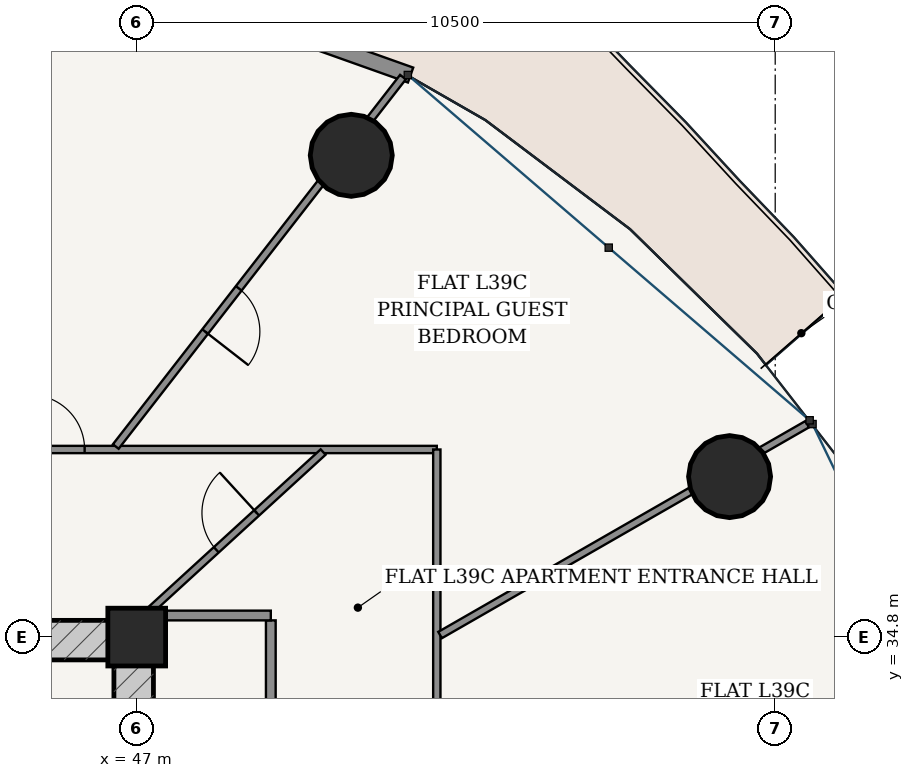
"""IFC4 building model, lengths in metres.
Left out: names, types, materials, properties, quantities, classifications, styles, units other than length and angle.
Written with IfcOpenShell. Run it as: python <this file> out.ifc"""

import sys

from ifc_helpers import new_model, si_unit, direction, frame, frame_2d, origin, origin_2d, place, context, subcontext, project, spatial, rectangle, hollow_circle, extrude, source, transform, mapped, element, fill, save


model = new_model("IFC4")
c1 = context("Model", 3, precision=1e-05, world=origin(), true_north=direction((-0.2419218956, 0.970295726276)))
c2 = subcontext(c1, "Body", "Model", "MODEL_VIEW")
j1 = project(units=[si_unit("LENGTHUNIT", "METRE"), si_unit("PLANEANGLEUNIT", "RADIAN")], contexts=[c1])
p1 = place(None, origin())
s1 = spatial("IfcSite", under=j1, at=p1, CompositionType="ELEMENT")
p2 = place(p1, origin())
s2 = spatial("IfcBuilding", under=s1, at=p2, CompositionType="ELEMENT")
p3 = place(p2, frame((0.0, 0.0, 149.8)))
s3 = spatial("IfcBuildingStorey", under=s2, at=p3, CompositionType="ELEMENT", Elevation=149.8)
p4 = place(p3, frame((47.0, 34.8, 0.0), z_axis=(0.0, 0.0, 1.0), x_axis=(1.0, 0.0, 0.0)))
e1 = element("IfcColumn", 1, at=p4, inside=s3, PredefinedType="COLUMN", context=c2, shape_type="SweptSolid", body=[
    extrude(rectangle(XDim=0.95, YDim=0.95, at=origin_2d()), origin(), (0.0, 0.0, 1.0), 3.6),
])
p5 = place(p3, frame((28.725, 34.75, 0.0), z_axis=(0.0, 0.0, 1.0), x_axis=(1.0, 0.0, 0.0)))
e2 = element("IfcWall", 2, at=p5, inside=s3, PredefinedType="SHEAR", context=c2, shape_type="SweptSolid", body=[
    extrude(rectangle(XDim=18.55, YDim=0.65, at=frame_2d((9.275, 0.0))), origin(), (0.0, 0.0, 1.0), 3.33),
])
p6 = place(p3, frame((46.95, 19.175, 0.0), z_axis=(0.0, 0.0, 1.0), x_axis=(0.0, 1.0, 0.0)))
e3 = element("IfcWall", 3, at=p6, inside=s3, PredefinedType="SHEAR", context=c2, shape_type="SweptSolid", body=[
    extrude(rectangle(XDim=15.25, YDim=0.65, at=frame_2d((7.625, 0.0))), origin(), (0.0, 0.0, 1.0), 3.33),
])
p7 = place(p6, frame((9.875, 0.0, 0.0)))
e4 = element("IfcOpeningElement", 4, at=p7, cuts=e3, PredefinedType="OPENING", context=c2, shape_type="SweptSolid", body=[
    extrude(rectangle(XDim=1.5, YDim=2.2, at=frame_2d((0.75, 1.1))), frame((0.0, 0.335, 0.0), z_axis=(0.0, -1.0, 0.0), x_axis=(1.0, 0.0, 0.0)), (0.0, 0.0, 1.0), 0.67),
])
for number, where, z_axis, x_axis in (
    (5, (56.75, 37.439, 0.0), (0.0, 0.0, 1.0), (1.0, 0.0, 0.0)),
    (6, (50.528, 42.723, 0.0), (0.0, 0.0, 1.0), (1.0, 0.0, 0.0)),
):
    element("IfcColumn", number, at=place(p3, frame(where, z_axis=z_axis, x_axis=x_axis)), inside=s3, PredefinedType="COLUMN", context=c2, shape_type="SweptSolid", body=[
        extrude(hollow_circle(Radius=0.675, WallThickness=0.042, at=origin_2d()), origin(), (0.0, 0.0, 1.0), 3.6),
    ])
p8 = place(p3, frame((51.503, 44.043, 0.0), z_axis=(0.0, 0.0, 1.0), x_axis=(-0.942095406405, 0.335344964522, 0.0)))
e7 = element("IfcWall", 7, at=p8, inside=s3, PredefinedType="SOLIDWALL", context=c2, shape_type="SweptSolid", body=[
    extrude(rectangle(XDim=9.408, YDim=0.26, at=frame_2d((4.704, 0.0))), origin(), (0.0, 0.0, 1.0), 3.33),
])
p9 = place(p8, frame((4.029, 0.0, 0.0)))
e8 = element("IfcOpeningElement", 8, at=p9, cuts=e7, PredefinedType="OPENING", context=c2, shape_type="SweptSolid", body=[
    extrude(rectangle(XDim=1.35, YDim=2.2, at=frame_2d((0.675, 1.1))), frame((0.0, 0.14, 0.0), z_axis=(0.0, -1.0, 0.0), x_axis=(1.0, 0.0, 0.0)), (0.0, 0.0, 1.0), 0.28),
])
p10 = place(p3, frame((49.205, 16.675, 0.0), z_axis=(0.0, 0.0, 1.0), x_axis=(0.0, 1.0, 0.0)))
e9 = element("IfcWall", 9, at=p10, inside=s3, PredefinedType="PARTITIONING", context=c2, shape_type="SweptSolid", body=[
    extrude(rectangle(XDim=18.4, YDim=0.16, at=frame_2d((9.2, 0.0))), origin(), (0.0, 0.0, 1.0), 2.776),
])
p11 = place(p10, frame((15.299, 0.0, 0.0)))
e10 = element("IfcOpeningElement", 10, at=p11, cuts=e9, PredefinedType="OPENING", context=c2, shape_type="SweptSolid", body=[
    extrude(rectangle(XDim=0.98, YDim=2.2, at=frame_2d((0.49, 1.1))), frame((0.0, 0.09, 0.0), z_axis=(0.0, -1.0, 0.0), x_axis=(1.0, 0.0, 0.0)), (0.0, 0.0, 1.0), 0.18),
])
p12 = place(p3, frame((47.275, 35.155, 0.0), z_axis=(0.0, 0.0, 1.0), x_axis=(1.0, 0.0, 0.0)))
e11 = element("IfcWall", 11, at=p12, inside=s3, PredefinedType="PARTITIONING", context=c2, shape_type="SweptSolid", body=[
    extrude(rectangle(XDim=1.93, YDim=0.16, at=frame_2d((0.965, 0.0))), origin(), (0.0, 0.0, 1.0), 2.776),
])
p13 = place(p3, frame((44.465, 37.885, 0.0), z_axis=(0.0, 0.0, 1.0), x_axis=(1.0, 0.0, 0.0)))
e12 = element("IfcWall", 12, at=p13, inside=s3, PredefinedType="PARTITIONING", context=c2, shape_type="SweptSolid", body=[
    extrude(rectangle(XDim=7.47, YDim=0.12, at=frame_2d((3.735, 0.0))), origin(), (0.0, 0.0, 1.0), 2.776),
])
p14 = place(p13, frame((0.778, 0.0, 0.0)))
e13 = element("IfcOpeningElement", 13, at=p14, cuts=e12, PredefinedType="OPENING", context=c2, shape_type="SweptSolid", body=[
    extrude(rectangle(XDim=0.9, YDim=2.15, at=frame_2d((0.45, 1.075))), frame((0.0, 0.07, 0.0), z_axis=(0.0, -1.0, 0.0), x_axis=(1.0, 0.0, 0.0)), (0.0, 0.0, 1.0), 0.14),
])
p15 = place(p3, frame((51.935, 37.885, 0.0), z_axis=(0.0, 0.0, 1.0), x_axis=(0.0, -1.0, 0.0)))
e14 = element("IfcWall", 14, at=p15, inside=s3, PredefinedType="PARTITIONING", context=c2, shape_type="SweptSolid", body=[
    extrude(rectangle(XDim=22.96, YDim=0.12, at=frame_2d((11.48, 0.0))), origin(), (0.0, 0.0, 1.0), 2.776),
])
p16 = place(p15, frame((4.61, 0.0, 0.0)))
e15 = element("IfcOpeningElement", 15, at=p16, cuts=e14, PredefinedType="OPENING", context=c2, shape_type="SweptSolid", body=[
    extrude(rectangle(XDim=0.9, YDim=2.15, at=frame_2d((0.45, 1.075))), frame((0.0, 0.07, 0.0), z_axis=(0.0, -1.0, 0.0), x_axis=(1.0, 0.0, 0.0)), (0.0, 0.0, 1.0), 0.14),
])
p17 = place(p15, frame((19.31, 0.0, 0.0)))
e16 = element("IfcOpeningElement", 16, at=p17, cuts=e14, PredefinedType="OPENING", context=c2, shape_type="SweptSolid", body=[
    extrude(rectangle(XDim=0.86, YDim=2.15, at=frame_2d((0.43, 1.075))), frame((0.0, 0.07, 0.0), z_axis=(0.0, -1.0, 0.0), x_axis=(1.0, 0.0, 0.0)), (0.0, 0.0, 1.0), 0.14),
])
p18 = place(p15, frame((13.341, 0.0, 0.0)))
e17 = element("IfcOpeningElement", 17, at=p18, cuts=e14, PredefinedType="OPENING", context=c2, shape_type="SweptSolid", body=[
    extrude(rectangle(XDim=0.9, YDim=2.15, at=frame_2d((0.45, 1.075))), frame((0.0, 0.07, 0.0), z_axis=(0.0, -1.0, 0.0), x_axis=(1.0, 0.0, 0.0)), (0.0, 0.0, 1.0), 0.14),
])
p19 = place(p3, frame((51.989, 34.834, 0.0), z_axis=(0.0, 0.0, 1.0), x_axis=(0.86717064002, 0.498011125466, 0.0)))
e18 = element("IfcWall", 18, at=p19, inside=s3, PredefinedType="PARTITIONING", context=c2, shape_type="SweptSolid", body=[
    extrude(rectangle(XDim=6.961, YDim=0.12, at=frame_2d((3.48, 0.0))), origin(), (0.0, 0.0, 1.0), 2.776),
])
p20 = place(p3, frame((46.656, 37.934, 0.0), z_axis=(0.0, 0.0, 1.0), x_axis=(0.613758289074, 0.789493991487, 0.0)))
e19 = element("IfcWall", 19, at=p20, inside=s3, PredefinedType="PARTITIONING", context=c2, shape_type="SweptSolid", body=[
    extrude(rectangle(XDim=7.695, YDim=0.12, at=frame_2d((3.848, 0.0))), origin(), (0.0, 0.0, 1.0), 2.776),
])
p21 = place(p20, frame((2.395, 0.0, 0.0)))
e20 = element("IfcOpeningElement", 20, at=p21, cuts=e19, PredefinedType="OPENING", context=c2, shape_type="SweptSolid", body=[
    extrude(rectangle(XDim=0.9, YDim=2.15, at=frame_2d((0.45, 1.075))), frame((0.0, 0.07, 0.0), z_axis=(0.0, -1.0, 0.0), x_axis=(1.0, 0.0, 0.0)), (0.0, 0.0, 1.0), 0.14),
])
p22 = place(p3, frame((47.216, 35.235, 0.0), z_axis=(0.0, 0.0, 1.0), x_axis=(0.73766811085, 0.675163504816, 0.0)))
e21 = element("IfcWall", 21, at=p22, inside=s3, PredefinedType="PARTITIONING", context=c2, shape_type="SweptSolid", body=[
    extrude(rectangle(XDim=3.863, YDim=0.12, at=frame_2d((1.932, 0.0))), origin(), (0.0, 0.0, 1.0), 2.776),
])
p23 = place(p22, frame((1.481, 0.0, 0.0)))
e22 = element("IfcOpeningElement", 22, at=p23, cuts=e21, PredefinedType="OPENING", context=c2, shape_type="SweptSolid", body=[
    extrude(rectangle(XDim=0.9, YDim=2.15, at=frame_2d((0.45, 1.075))), frame((0.0, 0.07, 0.0), z_axis=(0.0, -1.0, 0.0), x_axis=(1.0, 0.0, 0.0)), (0.0, 0.0, 1.0), 0.14),
])
m1 = source(origin(), c2, "Body", "SweptSolid", [
    extrude(rectangle(XDim=0.9, YDim=2.15, at=frame_2d((0.45, 1.075))), frame((0.0, 0.025, 0.0), z_axis=(0.0, -1.0, 0.0), x_axis=(1.0, 0.0, 0.0)), (0.0, 0.0, 1.0), 0.05),
])
p24 = place(p23, origin())
e23 = element("IfcDoor", 23, at=p24, inside=s3, OperationType="SINGLE_SWING_RIGHT", PredefinedType="DOOR", context=c2, shape_type="MappedRepresentation", body=[
    mapped(m1, transform((0.0, 0.0, 0.0), scale=1.0)),
])
fill(e22, e23)
p25 = place(p14, origin())
e24 = element("IfcDoor", 24, at=p25, inside=s3, OperationType="SINGLE_SWING_LEFT", PredefinedType="DOOR", context=c2, shape_type="MappedRepresentation", body=[
    mapped(m1, transform((0.0, 0.0, 0.0), scale=1.0)),
])
fill(e13, e24)
p26 = place(p21, frame((0.9, 0.0, 0.0), z_axis=(0.0, 0.0, 1.0), x_axis=(-1.0, 0.0, 0.0)))
e25 = element("IfcDoor", 25, at=p26, inside=s3, OperationType="SINGLE_SWING_RIGHT", PredefinedType="DOOR", context=c2, shape_type="MappedRepresentation", body=[
    mapped(m1, transform((0.0, 0.0, 0.0), scale=1.0)),
])
fill(e20, e25)
save(model, sys.argv[1])
